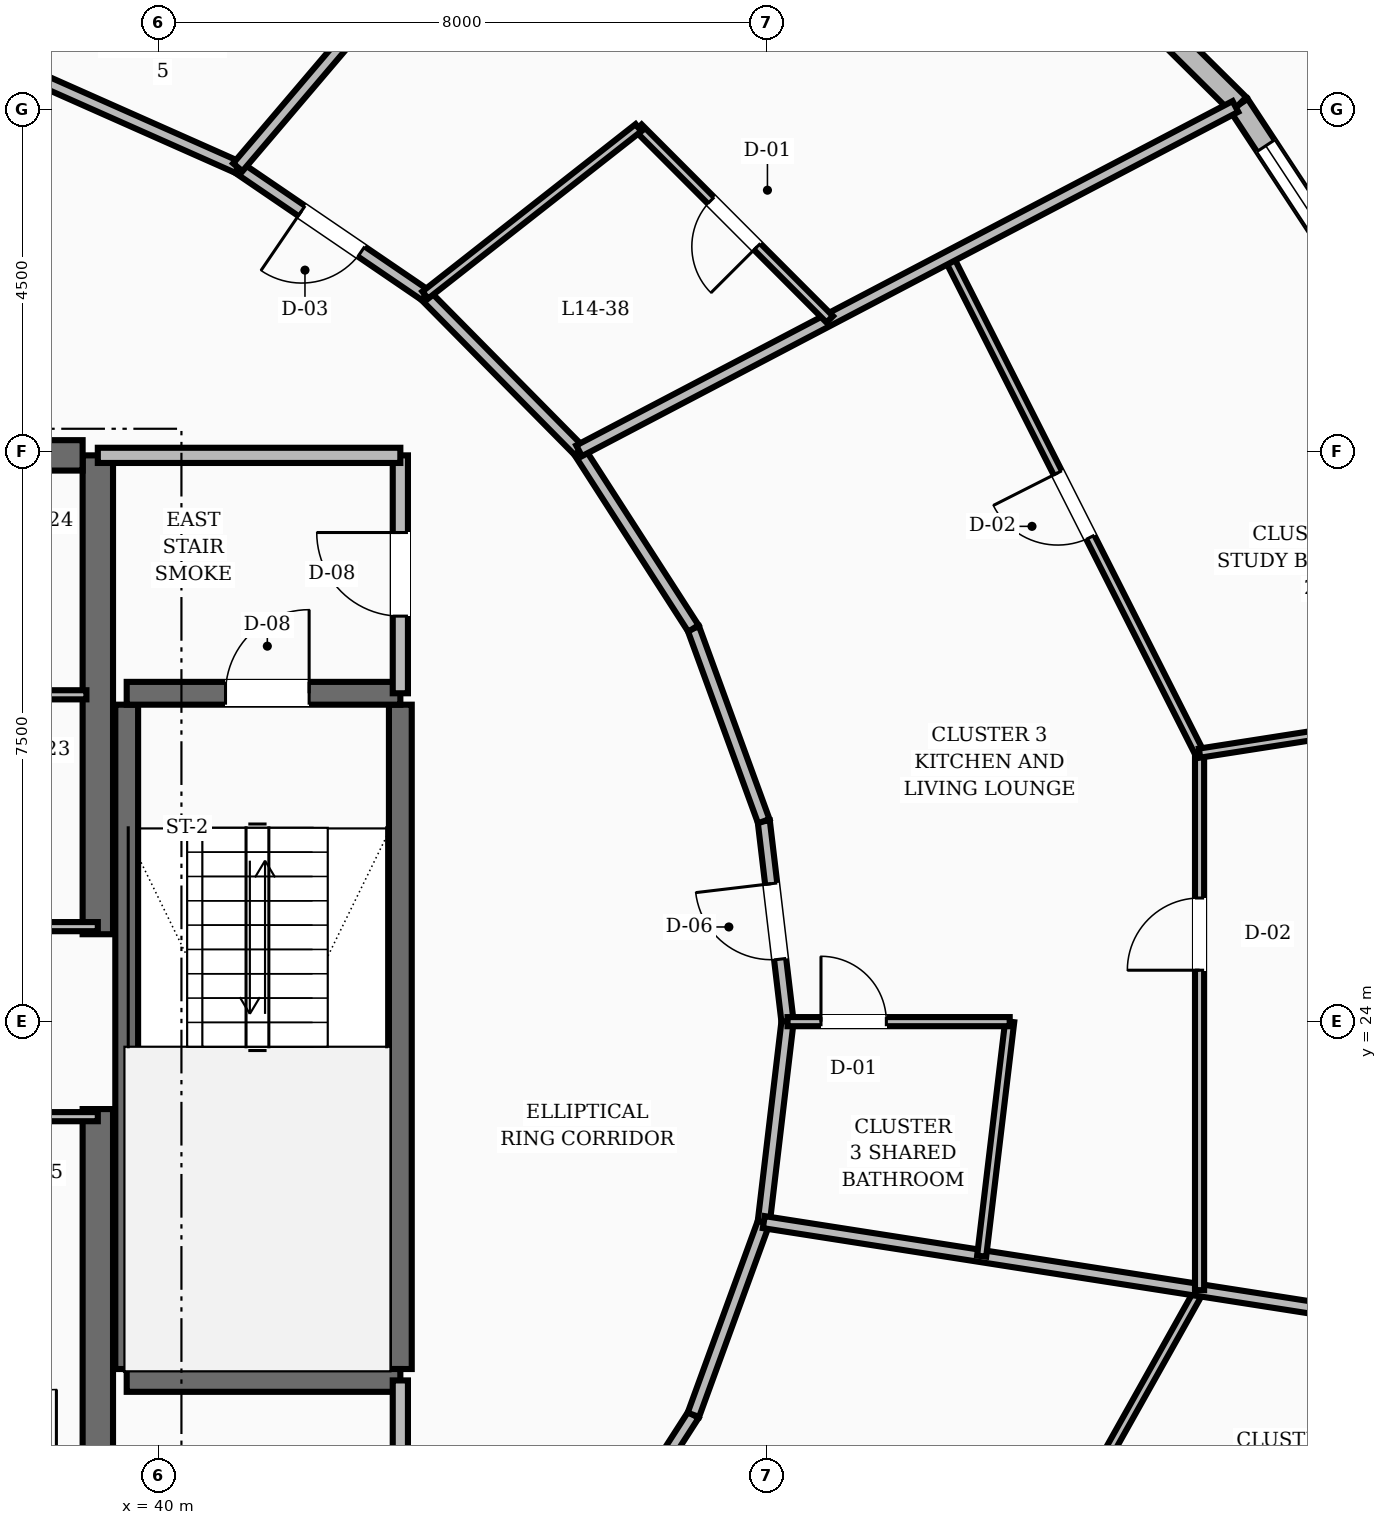
"""IFC4 building model, lengths in metres.
Left out: names, types, materials, properties, quantities, classifications, styles, units other than length and angle.
Written with IfcOpenShell. Run it as: python <this file> out.ifc"""

import sys

from ifc_helpers import new_model, si_unit, direction, frame, frame_2d, origin, place, context, subcontext, project, spatial, rectangle, extrude, element, fill, save


model = new_model("IFC4")
c1 = context("Model", 3, precision=1e-05, world=origin(), true_north=direction((0.0, 1.0)))
c2 = subcontext(c1, "Body", "Model", "MODEL_VIEW")
j1 = project(units=[si_unit("LENGTHUNIT", "METRE"), si_unit("PLANEANGLEUNIT", "RADIAN")], contexts=[c1])
p1 = place(None, origin())
s1 = spatial("IfcSite", under=j1, at=p1, CompositionType="ELEMENT")
p2 = place(p1, origin())
s2 = spatial("IfcBuilding", under=s1, at=p2, CompositionType="ELEMENT")
p3 = place(p2, frame((0.0, 0.0, 59.2)))
s3 = spatial("IfcBuildingStorey", under=s2, at=p3, CompositionType="ELEMENT", Elevation=59.2)
for number, where, z_axis, x_axis in (
    (1, (39.2, 16.55, 0.0), (0.0, 0.0, 1.0), (0.0, 1.0, 0.0)),
    (2, (39.2, 25.15, 0.0), (0.0, 0.0, 1.0), (0.0, 1.0, 0.0)),
):
    element("IfcWall", number, at=place(p3, frame(where, z_axis=z_axis, x_axis=x_axis)), inside=s3, PredefinedType="SHEAR", context=c2, shape_type="SweptSolid", body=[
        extrude(rectangle(XDim=6.3, YDim=0.4, at=frame_2d((3.15, 0.0))), origin(), (0.0, 0.0, 1.0), 3.6),
    ])
p4 = place(p3, frame((35.8, 31.45, 0.0), z_axis=(0.0, 0.0, 1.0), x_axis=(1.0, 0.0, 0.0)))
e3 = element("IfcWall", 3, at=p4, inside=s3, PredefinedType="SHEAR", context=c2, shape_type="SweptSolid", body=[
    extrude(rectangle(XDim=3.2, YDim=0.4, at=frame_2d((1.6, 0.0))), origin(), (0.0, 0.0, 1.0), 3.6),
])
p5 = place(p4, frame((0.3, 0.0, 0.0)))
e4 = element("IfcOpeningElement", 4, at=p5, cuts=e3, PredefinedType="OPENING", context=c2, shape_type="SweptSolid", body=[
    extrude(rectangle(XDim=1.1, YDim=2.1, at=frame_2d((0.55, 1.05))), frame((0.0, 0.21, 0.0), z_axis=(0.0, -1.0, 0.0), x_axis=(1.0, 0.0, 0.0)), (0.0, 0.0, 1.0), 0.42),
])
for number, where, z_axis, x_axis in (
    (5, (43.18, 19.43, 0.0), (0.0, 0.0, 1.0), (0.0, 1.0, 0.0)),
    (6, (39.58, 19.43, 0.0), (0.0, 0.0, 1.0), (0.0, 1.0, 0.0)),
):
    element("IfcWall", number, at=place(p3, frame(where, z_axis=z_axis, x_axis=x_axis)), inside=s3, PredefinedType="SHEAR", context=c2, shape_type="SweptSolid", body=[
        extrude(rectangle(XDim=8.74, YDim=0.3, at=frame_2d((4.37, 0.0))), origin(), (0.0, 0.0, 1.0), 3.6),
    ])
p6 = place(p3, frame((39.58, 19.28, 0.0), z_axis=(0.0, 0.0, 1.0), x_axis=(1.0, 0.0, 0.0)))
e7 = element("IfcWall", 7, at=p6, inside=s3, PredefinedType="SHEAR", context=c2, shape_type="SweptSolid", body=[
    extrude(rectangle(XDim=3.6, YDim=0.3, at=frame_2d((1.8, 0.0))), origin(), (0.0, 0.0, 1.0), 3.6),
])
p7 = place(p3, frame((39.58, 28.32, 0.0), z_axis=(0.0, 0.0, 1.0), x_axis=(1.0, 0.0, 0.0)))
e8 = element("IfcWall", 8, at=p7, inside=s3, PredefinedType="SHEAR", context=c2, shape_type="SweptSolid", body=[
    extrude(rectangle(XDim=3.6, YDim=0.3, at=frame_2d((1.8, 0.0))), origin(), (0.0, 0.0, 1.0), 3.6),
])
p8 = place(p7, frame((1.3, 0.0, 0.0)))
e9 = element("IfcOpeningElement", 9, at=p8, cuts=e8, PredefinedType="OPENING", context=c2, shape_type="SweptSolid", body=[
    extrude(rectangle(XDim=1.1, YDim=2.1, at=frame_2d((0.55, 1.05))), frame((0.0, 0.16, 0.0), z_axis=(0.0, -1.0, 0.0), x_axis=(1.0, 0.0, 0.0)), (0.0, 0.0, 1.0), 0.32),
])
p9 = place(p3, frame((56.679, 32.309, 0.0), z_axis=(0.0, 0.0, 1.0), x_axis=(-0.549434846356, 0.835536563898, 0.0)))
e10 = element("IfcWall", 10, at=p9, inside=s3, PredefinedType="STANDARD", context=c2, shape_type="SweptSolid", body=[
    extrude(rectangle(XDim=4.493, YDim=0.28, at=frame_2d((2.247, 0.0))), origin(), (0.0, 0.0, 1.0), 2.65),
])
p10 = place(p9, frame((0.646, 0.0, 0.8)))
e11 = element("IfcOpeningElement", 11, at=p10, cuts=e10, PredefinedType="OPENING", context=c2, shape_type="SweptSolid", body=[
    extrude(rectangle(XDim=3.2, YDim=1.65, at=frame_2d((1.6, 0.825))), frame((0.0, 0.15, 0.0), z_axis=(0.0, -1.0, 0.0), x_axis=(1.0, 0.0, 0.0)), (0.0, 0.0, 1.0), 0.3),
])
p11 = place(p3, frame((54.211, 36.063, 0.0), z_axis=(0.0, 0.0, 1.0), x_axis=(-0.710492625766, 0.70370464595, 0.0)))
e12 = element("IfcWall", 12, at=p11, inside=s3, PredefinedType="STANDARD", context=c2, shape_type="SweptSolid", body=[
    extrude(rectangle(XDim=4.676, YDim=0.28, at=frame_2d((2.338, 0.0))), origin(), (0.0, 0.0, 1.0), 2.65),
])
p12 = place(p3, frame((43.18, 28.32, 0.0), z_axis=(0.0, 0.0, 1.0), x_axis=(0.0, 1.0, 0.0)))
e13 = element("IfcWall", 13, at=p12, inside=s3, PredefinedType="SOLIDWALL", context=c2, shape_type="SweptSolid", body=[
    extrude(rectangle(XDim=3.13, YDim=0.2, at=frame_2d((1.565, 0.0))), origin(), (0.0, 0.0, 1.0), 2.61),
])
p13 = place(p12, frame((1.015, 0.0, 0.0)))
e14 = element("IfcOpeningElement", 14, at=p13, cuts=e13, PredefinedType="OPENING", context=c2, shape_type="SweptSolid", body=[
    extrude(rectangle(XDim=1.1, YDim=2.1, at=frame_2d((0.55, 1.05))), frame((0.0, 0.11, 0.0), z_axis=(0.0, -1.0, 0.0), x_axis=(1.0, 0.0, 0.0)), (0.0, 0.0, 1.0), 0.22),
])
p14 = place(p3, frame((39.2, 31.45, 0.0), z_axis=(0.0, 0.0, 1.0), x_axis=(1.0, 0.0, 0.0)))
e15 = element("IfcWall", 15, at=p14, inside=s3, PredefinedType="SOLIDWALL", context=c2, shape_type="SweptSolid", body=[
    extrude(rectangle(XDim=3.98, YDim=0.2, at=frame_2d((1.99, 0.0))), origin(), (0.0, 0.0, 1.0), 2.61),
])
p15 = place(p3, frame((43.18, 16.55, 0.0), z_axis=(0.0, 0.0, 1.0), x_axis=(0.0, 1.0, 0.0)))
e16 = element("IfcWall", 16, at=p15, inside=s3, PredefinedType="SOLIDWALL", context=c2, shape_type="SweptSolid", body=[
    extrude(rectangle(XDim=2.73, YDim=0.2, at=frame_2d((1.365, 0.0))), origin(), (0.0, 0.0, 1.0), 2.61),
])
p16 = place(p15, frame((0.89, 0.0, 0.0)))
e17 = element("IfcOpeningElement", 17, at=p16, cuts=e16, PredefinedType="OPENING", context=c2, shape_type="SweptSolid", body=[
    extrude(rectangle(XDim=0.95, YDim=2.1, at=frame_2d((0.475, 1.05))), frame((0.0, 0.11, 0.0), z_axis=(0.0, -1.0, 0.0), x_axis=(1.0, 0.0, 0.0)), (0.0, 0.0, 1.0), 0.22),
])
for number, where, z_axis, x_axis in (
    (18, (37.4, 25.25, 0.0), (0.0, 0.0, 1.0), (1.0, 0.0, 0.0)),
    (19, (37.4, 22.75, 0.0), (0.0, 0.0, 1.0), (1.0, 0.0, 0.0)),
):
    element("IfcWall", number, at=place(p3, frame(where, z_axis=z_axis, x_axis=x_axis)), inside=s3, PredefinedType="PARTITIONING", context=c2, shape_type="SweptSolid", body=[
        extrude(rectangle(XDim=1.8, YDim=0.12, at=frame_2d((0.9, 0.0))), origin(), (0.0, 0.0, 1.0), 2.61),
    ])
p17 = place(p3, frame((37.4, 28.3, 0.0), z_axis=(0.0, 0.0, 1.0), x_axis=(1.0, 0.0, 0.0)))
e20 = element("IfcWall", 20, at=p17, inside=s3, PredefinedType="PARTITIONING", context=c2, shape_type="SweptSolid", body=[
    extrude(rectangle(XDim=1.65, YDim=0.12, at=frame_2d((0.825, 0.0))), origin(), (0.0, 0.0, 1.0), 2.61),
])
p18 = place(p3, frame((48.274, 24.0, 0.0), z_axis=(0.0, 0.0, 1.0), x_axis=(-0.117763961213, 0.99304161516, 0.0)))
e21 = element("IfcWall", 21, at=p18, inside=s3, PredefinedType="SOLIDWALL", context=c2, shape_type="SweptSolid", body=[
    extrude(rectangle(XDim=2.656, YDim=0.16, at=frame_2d((1.328, 0.0))), origin(), (0.0, 0.0, 1.0), 2.61),
])
p19 = place(p18, frame((0.828, 0.0, 0.0)))
e22 = element("IfcOpeningElement", 22, at=p19, cuts=e21, PredefinedType="OPENING", context=c2, shape_type="SweptSolid", body=[
    extrude(rectangle(XDim=1.0, YDim=2.1, at=frame_2d((0.5, 1.05))), frame((0.0, 0.09, 0.0), z_axis=(0.0, -1.0, 0.0), x_axis=(1.0, 0.0, 0.0)), (0.0, 0.0, 1.0), 0.18),
])
p20 = place(p3, frame((47.961, 26.637, 0.0), z_axis=(0.0, 0.0, 1.0), x_axis=(-0.343013437329, 0.939330496583, 0.0)))
e23 = element("IfcWall", 23, at=p20, inside=s3, PredefinedType="SOLIDWALL", context=c2, shape_type="SweptSolid", body=[
    extrude(rectangle(XDim=2.7, YDim=0.16, at=frame_2d((1.35, 0.0))), origin(), (0.0, 0.0, 1.0), 2.61),
])
p21 = place(p3, frame((47.035, 29.173, 0.0), z_axis=(0.0, 0.0, 1.0), x_axis=(-0.541126045017, 0.840941498206, 0.0)))
e24 = element("IfcWall", 24, at=p21, inside=s3, PredefinedType="SOLIDWALL", context=c2, shape_type="SweptSolid", body=[
    extrude(rectangle(XDim=2.779, YDim=0.16, at=frame_2d((1.39, 0.0))), origin(), (0.0, 0.0, 1.0), 2.61),
])
p22 = place(p3, frame((45.531, 31.51, 0.0), z_axis=(0.0, 0.0, 1.0), x_axis=(-0.702811997, 0.711375636969, 0.0)))
e25 = element("IfcWall", 25, at=p22, inside=s3, PredefinedType="SOLIDWALL", context=c2, shape_type="SweptSolid", body=[
    extrude(rectangle(XDim=2.879, YDim=0.16, at=frame_2d((1.44, 0.0))), origin(), (0.0, 0.0, 1.0), 2.61),
])
p23 = place(p3, frame((43.508, 33.559, 0.0), z_axis=(0.0, 0.0, 1.0), x_axis=(-0.826293096206, 0.56324037423, 0.0)))
e26 = element("IfcWall", 26, at=p23, inside=s3, PredefinedType="SOLIDWALL", context=c2, shape_type="SweptSolid", body=[
    extrude(rectangle(XDim=2.985, YDim=0.16, at=frame_2d((1.492, 0.0))), origin(), (0.0, 0.0, 1.0), 2.61),
])
p24 = place(p23, frame((1.017, 0.0, 0.0)))
e27 = element("IfcOpeningElement", 27, at=p24, cuts=e26, PredefinedType="OPENING", context=c2, shape_type="SweptSolid", body=[
    extrude(rectangle(XDim=0.95, YDim=2.1, at=frame_2d((0.475, 1.05))), frame((0.0, 0.09, 0.0), z_axis=(0.0, -1.0, 0.0), x_axis=(1.0, 0.0, 0.0)), (0.0, 0.0, 1.0), 0.18),
])
p25 = place(p3, frame((41.041, 35.24, 0.0), z_axis=(0.0, 0.0, 1.0), x_axis=(-0.913952123493, 0.405822024984, 0.0)))
e28 = element("IfcWall", 28, at=p25, inside=s3, PredefinedType="SOLIDWALL", context=c2, shape_type="SweptSolid", body=[
    extrude(rectangle(XDim=3.078, YDim=0.16, at=frame_2d((1.539, 0.0))), origin(), (0.0, 0.0, 1.0), 2.61),
])
p26 = place(p3, frame((45.531, 16.49, 0.0), z_axis=(0.0, 0.0, 1.0), x_axis=(0.541126045017, 0.840941498206, 0.0)))
e29 = element("IfcWall", 29, at=p26, inside=s3, PredefinedType="SOLIDWALL", context=c2, shape_type="SweptSolid", body=[
    extrude(rectangle(XDim=2.779, YDim=0.16, at=frame_2d((1.39, 0.0))), origin(), (0.0, 0.0, 1.0), 2.61),
])
p27 = place(p3, frame((47.035, 18.827, 0.0), z_axis=(0.0, 0.0, 1.0), x_axis=(0.343013437329, 0.939330496583, 0.0)))
e30 = element("IfcWall", 30, at=p27, inside=s3, PredefinedType="SOLIDWALL", context=c2, shape_type="SweptSolid", body=[
    extrude(rectangle(XDim=2.7, YDim=0.16, at=frame_2d((1.35, 0.0))), origin(), (0.0, 0.0, 1.0), 2.61),
])
p28 = place(p3, frame((47.961, 21.363, 0.0), z_axis=(0.0, 0.0, 1.0), x_axis=(0.117763961213, 0.99304161516, 0.0)))
e31 = element("IfcWall", 31, at=p28, inside=s3, PredefinedType="SOLIDWALL", context=c2, shape_type="SweptSolid", body=[
    extrude(rectangle(XDim=2.656, YDim=0.16, at=frame_2d((1.328, 0.0))), origin(), (0.0, 0.0, 1.0), 2.61),
])
p29 = place(p3, frame((50.131, 14.115, 0.0), z_axis=(0.0, 0.0, 1.0), x_axis=(0.489207447667, 0.872167457056, 0.0)))
e32 = element("IfcWall", 32, at=p29, inside=s3, PredefinedType="PARTITIONING", context=c2, shape_type="SweptSolid", body=[
    extrude(rectangle(XDim=7.284, YDim=0.12, at=frame_2d((3.642, 0.0))), origin(), (0.0, 0.0, 1.0), 2.61),
])
p30 = place(p29, frame((3.167, 0.0, 0.0)))
e33 = element("IfcOpeningElement", 33, at=p30, cuts=e32, PredefinedType="OPENING", context=c2, shape_type="SweptSolid", body=[
    extrude(rectangle(XDim=0.95, YDim=2.1, at=frame_2d((0.475, 1.05))), frame((0.0, 0.07, 0.0), z_axis=(0.0, -1.0, 0.0), x_axis=(1.0, 0.0, 0.0)), (0.0, 0.0, 1.0), 0.14),
])
p31 = place(p3, frame((47.961, 21.363, 0.0), z_axis=(0.0, 0.0, 1.0), x_axis=(0.988025684157, -0.154289492336, 0.0)))
e34 = element("IfcWall", 34, at=p31, inside=s3, PredefinedType="SOLIDWALL", context=c2, shape_type="SweptSolid", body=[
    extrude(rectangle(XDim=10.312, YDim=0.16, at=frame_2d((5.156, 0.0))), origin(), (0.0, 0.0, 1.0), 2.61),
])
p32 = place(p3, frame((50.828, 20.915, 0.0), z_axis=(0.0, 0.0, 1.0), x_axis=(0.118742368253, 0.992925097871, 0.0)))
e35 = element("IfcWall", 35, at=p32, inside=s3, PredefinedType="PARTITIONING", context=c2, shape_type="SweptSolid", body=[
    extrude(rectangle(XDim=3.107, YDim=0.12, at=frame_2d((1.553, 0.0))), origin(), (0.0, 0.0, 1.0), 2.61),
])
p33 = place(p3, frame((48.274, 24.0, 0.0), z_axis=(0.0, 0.0, 1.0), x_axis=(1.0, 0.0, 0.0)))
e36 = element("IfcWall", 36, at=p33, inside=s3, PredefinedType="PARTITIONING", context=c2, shape_type="SweptSolid", body=[
    extrude(rectangle(XDim=2.923, YDim=0.12, at=frame_2d((1.461, 0.0))), origin(), (0.0, 0.0, 1.0), 2.61),
])
p34 = place(p33, frame((0.44, 0.0, 0.0)))
e37 = element("IfcOpeningElement", 37, at=p34, cuts=e36, PredefinedType="OPENING", context=c2, shape_type="SweptSolid", body=[
    extrude(rectangle(XDim=0.86, YDim=2.1, at=frame_2d((0.43, 1.05))), frame((0.0, 0.07, 0.0), z_axis=(0.0, -1.0, 0.0), x_axis=(1.0, 0.0, 0.0)), (0.0, 0.0, 1.0), 0.14),
])
p35 = place(p3, frame((53.695, 20.468, 0.0), z_axis=(0.0, 0.0, 1.0), x_axis=(0.0, 1.0, 0.0)))
e38 = element("IfcWall", 38, at=p35, inside=s3, PredefinedType="PARTITIONING", context=c2, shape_type="SweptSolid", body=[
    extrude(rectangle(XDim=7.065, YDim=0.12, at=frame_2d((3.532, 0.0))), origin(), (0.0, 0.0, 1.0), 2.61),
])
p36 = place(p35, frame((4.209, 0.0, 0.0)))
e39 = element("IfcOpeningElement", 39, at=p36, cuts=e38, PredefinedType="OPENING", context=c2, shape_type="SweptSolid", body=[
    extrude(rectangle(XDim=0.95, YDim=2.1, at=frame_2d((0.475, 1.05))), frame((0.0, 0.07, 0.0), z_axis=(0.0, -1.0, 0.0), x_axis=(1.0, 0.0, 0.0)), (0.0, 0.0, 1.0), 0.14),
])
p37 = place(p3, frame((53.695, 27.532, 0.0), z_axis=(0.0, 0.0, 1.0), x_axis=(-0.45148033716, 0.892281068474, 0.0)))
e40 = element("IfcWall", 40, at=p37, inside=s3, PredefinedType="PARTITIONING", context=c2, shape_type="SweptSolid", body=[
    extrude(rectangle(XDim=7.315, YDim=0.12, at=frame_2d((3.658, 0.0))), origin(), (0.0, 0.0, 1.0), 2.61),
])
p38 = place(p37, frame((3.183, 0.0, 0.0)))
e41 = element("IfcOpeningElement", 41, at=p38, cuts=e40, PredefinedType="OPENING", context=c2, shape_type="SweptSolid", body=[
    extrude(rectangle(XDim=0.95, YDim=2.1, at=frame_2d((0.475, 1.05))), frame((0.0, 0.07, 0.0), z_axis=(0.0, -1.0, 0.0), x_axis=(1.0, 0.0, 0.0)), (0.0, 0.0, 1.0), 0.14),
])
p39 = place(p3, frame((53.695, 27.532, 0.0), z_axis=(0.0, 0.0, 1.0), x_axis=(0.988023643712, 0.154302558199, 0.0)))
e42 = element("IfcWall", 42, at=p39, inside=s3, PredefinedType="PARTITIONING", context=c2, shape_type="SweptSolid", body=[
    extrude(rectangle(XDim=4.509, YDim=0.12, at=frame_2d((2.255, 0.0))), origin(), (0.0, 0.0, 1.0), 2.61),
])
p40 = place(p3, frame((45.531, 31.51, 0.0), z_axis=(0.0, 0.0, 1.0), x_axis=(0.885565291544, 0.464514923778, 0.0)))
e43 = element("IfcWall", 43, at=p40, inside=s3, PredefinedType="SOLIDWALL", context=c2, shape_type="SweptSolid", body=[
    extrude(rectangle(XDim=9.751, YDim=0.16, at=frame_2d((4.875, 0.0))), origin(), (0.0, 0.0, 1.0), 2.61),
])
p41 = place(p3, frame((48.83, 33.24, 0.0), z_axis=(0.0, 0.0, 1.0), x_axis=(-0.706661122184, 0.707552159486, 0.0)))
e44 = element("IfcWall", 44, at=p41, inside=s3, PredefinedType="PARTITIONING", context=c2, shape_type="SweptSolid", body=[
    extrude(rectangle(XDim=3.562, YDim=0.12, at=frame_2d((1.781, 0.0))), origin(), (0.0, 0.0, 1.0), 2.61),
])
p42 = place(p41, frame((1.351, 0.0, 0.0)))
e45 = element("IfcOpeningElement", 45, at=p42, cuts=e44, PredefinedType="OPENING", context=c2, shape_type="SweptSolid", body=[
    extrude(rectangle(XDim=0.86, YDim=2.1, at=frame_2d((0.43, 1.05))), frame((0.0, 0.07, 0.0), z_axis=(0.0, -1.0, 0.0), x_axis=(1.0, 0.0, 0.0)), (0.0, 0.0, 1.0), 0.14),
])
p43 = place(p3, frame((43.508, 33.559, 0.0), z_axis=(0.0, 0.0, 1.0), x_axis=(0.786586722527, 0.617479819868, 0.0)))
e46 = element("IfcWall", 46, at=p43, inside=s3, PredefinedType="PARTITIONING", context=c2, shape_type="SweptSolid", body=[
    extrude(rectangle(XDim=3.566, YDim=0.12, at=frame_2d((1.783, 0.0))), origin(), (0.0, 0.0, 1.0), 2.61),
])
p44 = place(p3, frame((41.041, 35.24, 0.0), z_axis=(0.0, 0.0, 1.0), x_axis=(0.648157225864, 0.761506540064, 0.0)))
e47 = element("IfcWall", 47, at=p44, inside=s3, PredefinedType="SOLIDWALL", context=c2, shape_type="SweptSolid", body=[
    extrude(rectangle(XDim=8.898, YDim=0.16, at=frame_2d((4.449, 0.0))), origin(), (0.0, 0.0, 1.0), 2.61),
])
p45 = place(p3, frame((38.228, 36.489, 0.0), z_axis=(0.0, 0.0, 1.0), x_axis=(0.466680348687, 0.884426058045, 0.0)))
e48 = element("IfcWall", 48, at=p45, inside=s3, PredefinedType="PARTITIONING", context=c2, shape_type="SweptSolid", body=[
    extrude(rectangle(XDim=3.253, YDim=0.12, at=frame_2d((1.626, 0.0))), origin(), (0.0, 0.0, 1.0), 2.61),
])
p46 = place(p10, origin())
e49 = element("IfcWindow", 49, at=p46, inside=s3, PartitioningType="SINGLE_PANEL", PredefinedType="WINDOW", context=c2, shape_type="SweptSolid", body=[
    extrude(rectangle(XDim=3.2, YDim=1.65, at=frame_2d((1.6, 0.825))), frame((0.0, 0.03, 0.0), z_axis=(0.0, -1.0, 0.0), x_axis=(1.0, 0.0, 0.0)), (0.0, 0.0, 1.0), 0.06),
])
fill(e11, e49)
p47 = place(p8, origin())
e50 = element("IfcDoor", 50, at=p47, inside=s3, OperationType="SINGLE_SWING_RIGHT", PredefinedType="DOOR", context=c2, shape_type="SweptSolid", body=[
    extrude(rectangle(XDim=1.1, YDim=2.1, at=frame_2d((0.55, 1.05))), frame((0.0, 0.025, 0.0), z_axis=(0.0, -1.0, 0.0), x_axis=(1.0, 0.0, 0.0)), (0.0, 0.0, 1.0), 0.05),
])
fill(e9, e50)
p48 = place(p13, origin())
e51 = element("IfcDoor", 51, at=p48, inside=s3, OperationType="SINGLE_SWING_RIGHT", PredefinedType="DOOR", context=c2, shape_type="SweptSolid", body=[
    extrude(rectangle(XDim=1.1, YDim=2.1, at=frame_2d((0.55, 1.05))), frame((0.0, 0.025, 0.0), z_axis=(0.0, -1.0, 0.0), x_axis=(1.0, 0.0, 0.0)), (0.0, 0.0, 1.0), 0.05),
])
fill(e14, e51)
p49 = place(p34, origin())
e52 = element("IfcDoor", 52, at=p49, inside=s3, OperationType="SINGLE_SWING_LEFT", PredefinedType="DOOR", context=c2, shape_type="SweptSolid", body=[
    extrude(rectangle(XDim=0.86, YDim=2.1, at=frame_2d((0.43, 1.05))), frame((0.0, 0.025, 0.0), z_axis=(0.0, -1.0, 0.0), x_axis=(1.0, 0.0, 0.0)), (0.0, 0.0, 1.0), 0.05),
])
fill(e37, e52)
p50 = place(p19, origin())
e53 = element("IfcDoor", 53, at=p50, inside=s3, OperationType="SINGLE_SWING_RIGHT", PredefinedType="DOOR", context=c2, shape_type="SweptSolid", body=[
    extrude(rectangle(XDim=1.0, YDim=2.1, at=frame_2d((0.5, 1.05))), frame((0.0, 0.025, 0.0), z_axis=(0.0, -1.0, 0.0), x_axis=(1.0, 0.0, 0.0)), (0.0, 0.0, 1.0), 0.05),
])
fill(e22, e53)
p51 = place(p36, origin())
e54 = element("IfcDoor", 54, at=p51, inside=s3, OperationType="SINGLE_SWING_LEFT", PredefinedType="DOOR", context=c2, shape_type="SweptSolid", body=[
    extrude(rectangle(XDim=0.95, YDim=2.1, at=frame_2d((0.475, 1.05))), frame((0.0, 0.025, 0.0), z_axis=(0.0, -1.0, 0.0), x_axis=(1.0, 0.0, 0.0)), (0.0, 0.0, 1.0), 0.05),
])
fill(e39, e54)
p52 = place(p38, origin())
e55 = element("IfcDoor", 55, at=p52, inside=s3, OperationType="SINGLE_SWING_RIGHT", PredefinedType="DOOR", context=c2, shape_type="SweptSolid", body=[
    extrude(rectangle(XDim=0.95, YDim=2.1, at=frame_2d((0.475, 1.05))), frame((0.0, 0.025, 0.0), z_axis=(0.0, -1.0, 0.0), x_axis=(1.0, 0.0, 0.0)), (0.0, 0.0, 1.0), 0.05),
])
fill(e41, e55)
p53 = place(p42, origin())
e56 = element("IfcDoor", 56, at=p53, inside=s3, OperationType="SINGLE_SWING_LEFT", PredefinedType="DOOR", context=c2, shape_type="SweptSolid", body=[
    extrude(rectangle(XDim=0.86, YDim=2.1, at=frame_2d((0.43, 1.05))), frame((0.0, 0.025, 0.0), z_axis=(0.0, -1.0, 0.0), x_axis=(1.0, 0.0, 0.0)), (0.0, 0.0, 1.0), 0.05),
])
fill(e45, e56)
p54 = place(p24, origin())
e57 = element("IfcDoor", 57, at=p54, inside=s3, OperationType="SINGLE_SWING_RIGHT", PredefinedType="DOOR", context=c2, shape_type="SweptSolid", body=[
    extrude(rectangle(XDim=0.95, YDim=2.1, at=frame_2d((0.475, 1.05))), frame((0.0, 0.025, 0.0), z_axis=(0.0, -1.0, 0.0), x_axis=(1.0, 0.0, 0.0)), (0.0, 0.0, 1.0), 0.05),
])
fill(e27, e57)
save(model, sys.argv[1])
